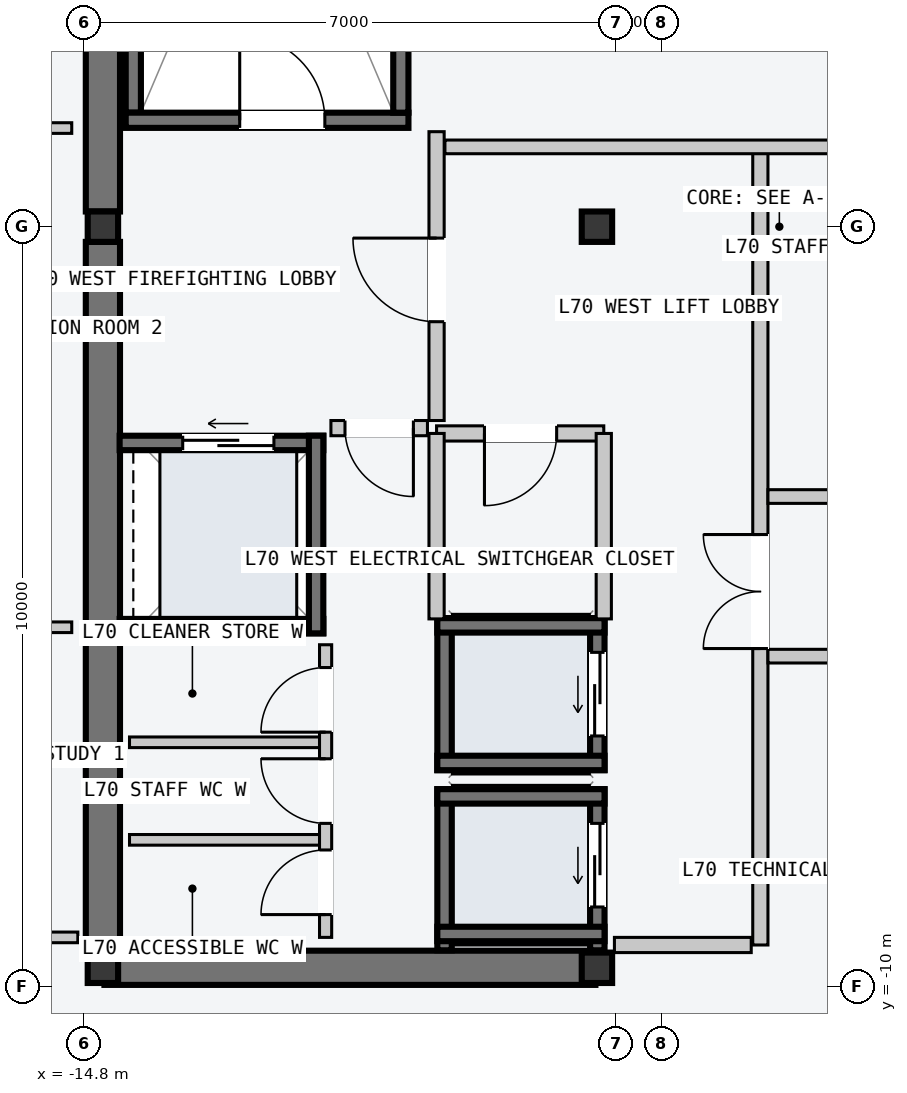
"""IFC4 building model, lengths in metres.
Left out: names, types, materials, properties, quantities, classifications, styles, units other than length and angle.
Written with IfcOpenShell. Run it as: python <this file> out.ifc"""

import sys

from ifc_helpers import new_model, si_unit, direction, frame, frame_2d, origin, origin_2d, place, context, subcontext, project, spatial, rectangle, i_section, extrude, element, fill, save


model = new_model("IFC4")
c1 = context("Model", 3, precision=1e-05, world=origin(), true_north=direction((0.0, 1.0)))
c2 = subcontext(c1, "Body", "Model", "MODEL_VIEW")
j1 = project(units=[si_unit("LENGTHUNIT", "METRE"), si_unit("PLANEANGLEUNIT", "RADIAN")], contexts=[c1])
p1 = place(None, origin())
s1 = spatial("IfcSite", under=j1, at=p1, CompositionType="ELEMENT")
p2 = place(p1, origin())
s2 = spatial("IfcBuilding", under=s1, at=p2, CompositionType="ELEMENT")
p3 = place(p2, frame((0.0, 0.0, 265.2)))
s3 = spatial("IfcBuildingStorey", under=s2, at=p3, CompositionType="ELEMENT", Elevation=265.2)
p4 = place(p3, frame((-14.53, -9.75, -0.2), z_axis=(0.0, 0.0, 1.0), x_axis=(1.0, 0.0, 0.0)))
e1 = element("IfcWall", 1, at=p4, inside=s3, PredefinedType="SHEAR", context=c2, shape_type="SweptSolid", body=[
    extrude(rectangle(XDim=6.46, YDim=0.45, at=frame_2d((3.23, 0.0))), origin(), (0.0, 0.0, 1.0), 3.6),
])
for number, where, z_axis, x_axis in (
    (2, (-14.55, -9.55, -0.2), (0.0, 0.0, 1.0), (0.0, 1.0, 0.0)),
    (3, (-14.55, 0.2, -0.2), (0.0, 0.0, 1.0), (0.0, 1.0, 0.0)),
):
    element("IfcWall", number, at=place(p3, frame(where, z_axis=z_axis, x_axis=x_axis)), inside=s3, PredefinedType="SHEAR", context=c2, shape_type="SweptSolid", body=[
        extrude(rectangle(XDim=9.35, YDim=0.45, at=frame_2d((4.675, 0.0))), origin(), (0.0, 0.0, 1.0), 3.6),
    ])
p5 = place(p3, frame((-14.15, 1.5, -0.2), z_axis=(0.0, 0.0, 1.0), x_axis=(0.0, 1.0, 0.0)))
e4 = element("IfcWall", 4, at=p5, inside=s3, PredefinedType="SOLIDWALL", context=c2, shape_type="SweptSolid", body=[
    extrude(rectangle(XDim=7.8, YDim=0.2, at=frame_2d((3.9, 0.0))), origin(), (0.0, 0.0, 1.0), 3.6),
])
p6 = place(p3, frame((-14.25, 1.4, -0.2), z_axis=(0.0, 0.0, 1.0), x_axis=(1.0, 0.0, 0.0)))
e5 = element("IfcWall", 5, at=p6, inside=s3, PredefinedType="SOLIDWALL", context=c2, shape_type="SweptSolid", body=[
    extrude(rectangle(XDim=3.72, YDim=0.2, at=frame_2d((1.86, 0.0))), origin(), (0.0, 0.0, 1.0), 3.6),
])
p7 = place(p6, frame((1.5, 0.0, 0.2)))
e6 = element("IfcOpeningElement", 6, at=p7, cuts=e5, PredefinedType="OPENING", context=c2, shape_type="SweptSolid", body=[
    extrude(rectangle(XDim=1.12, YDim=2.18, at=frame_2d((0.56, 1.09))), frame((0.0, 0.11, 0.0), z_axis=(0.0, -1.0, 0.0), x_axis=(1.0, 0.0, 0.0)), (0.0, 0.0, 1.0), 0.22),
])
p8 = place(p3, frame((-10.63, 1.5, -0.2), z_axis=(0.0, 0.0, 1.0), x_axis=(0.0, 1.0, 0.0)))
e7 = element("IfcWall", 7, at=p8, inside=s3, PredefinedType="SOLIDWALL", context=c2, shape_type="SweptSolid", body=[
    extrude(rectangle(XDim=7.8, YDim=0.2, at=frame_2d((3.9, 0.0))), origin(), (0.0, 0.0, 1.0), 3.6),
])
for number, where, z_axis, x_axis in (
    (8, (-14.55, -9.75, 0.0), (0.0, 0.0, 1.0), (1.0, 0.0, 0.0)),
    (9, (-14.55, 0.0, 0.0), (0.0, 0.0, 1.0), (1.0, 0.0, 0.0)),
    (10, (-8.05, -9.75, 0.0), (0.0, 0.0, 1.0), (1.0, 0.0, 0.0)),
    (11, (-8.05, 0.0, 0.0), (0.0, 0.0, 1.0), (1.0, 0.0, 0.0)),
):
    element("IfcColumn", number, at=place(p3, frame(where, z_axis=z_axis, x_axis=x_axis)), inside=s3, PredefinedType="COLUMN", context=c2, shape_type="SweptSolid", body=[
        extrude(i_section(OverallWidth=0.4, OverallDepth=0.4, WebThickness=0.013, FlangeThickness=0.021, at=origin_2d()), origin(), (0.0, 0.0, 1.0), 3.6),
    ])
p9 = place(p3, frame((-8.045, -9.52, -0.2), z_axis=(0.0, 0.0, 1.0), x_axis=(0.0, 1.0, 0.0)))
e12 = element("IfcWall", 12, at=p9, inside=s3, PredefinedType="SOLIDWALL", context=c2, shape_type="SweptSolid", body=[
    extrude(rectangle(XDim=2.12, YDim=0.19, at=frame_2d((1.06, 0.0))), origin(), (0.0, 0.0, 1.0), 3.6),
])
p10 = place(p9, frame((0.57, 0.0, 0.2)))
e13 = element("IfcOpeningElement", 13, at=p10, cuts=e12, PredefinedType="OPENING", context=c2, shape_type="SweptSolid", body=[
    extrude(rectangle(XDim=1.1, YDim=2.2, at=frame_2d((0.55, 1.1))), frame((0.0, 0.105, 0.0), z_axis=(0.0, -1.0, 0.0), x_axis=(1.0, 0.0, 0.0)), (0.0, 0.0, 1.0), 0.21),
])
p11 = place(p3, frame((-10.055, -9.52, -0.2), z_axis=(0.0, 0.0, 1.0), x_axis=(0.0, 1.0, 0.0)))
e14 = element("IfcWall", 14, at=p11, inside=s3, PredefinedType="SOLIDWALL", context=c2, shape_type="SweptSolid", body=[
    extrude(rectangle(XDim=2.12, YDim=0.19, at=frame_2d((1.06, 0.0))), origin(), (0.0, 0.0, 1.0), 3.6),
])
for number, where, z_axis, x_axis in (
    (15, (-10.15, -7.495, -0.2), (0.0, 0.0, 1.0), (1.0, 0.0, 0.0)),
    (16, (-10.15, -9.305, -0.2), (0.0, 0.0, 1.0), (1.0, 0.0, 0.0)),
):
    element("IfcWall", number, at=place(p3, frame(where, z_axis=z_axis, x_axis=x_axis)), inside=s3, PredefinedType="SOLIDWALL", context=c2, shape_type="SweptSolid", body=[
        extrude(rectangle(XDim=2.2, YDim=0.19, at=frame_2d((1.1, 0.0))), origin(), (0.0, 0.0, 1.0), 3.6),
    ])
p12 = place(p3, frame((-8.045, -7.15, -0.2), z_axis=(0.0, 0.0, 1.0), x_axis=(0.0, 1.0, 0.0)))
e17 = element("IfcWall", 17, at=p12, inside=s3, PredefinedType="SOLIDWALL", context=c2, shape_type="SweptSolid", body=[
    extrude(rectangle(XDim=2.0, YDim=0.19, at=frame_2d((1.0, 0.0))), origin(), (0.0, 0.0, 1.0), 3.6),
])
p13 = place(p12, frame((0.45, 0.0, 0.2)))
e18 = element("IfcOpeningElement", 18, at=p13, cuts=e17, PredefinedType="OPENING", context=c2, shape_type="SweptSolid", body=[
    extrude(rectangle(XDim=1.1, YDim=2.2, at=frame_2d((0.55, 1.1))), frame((0.0, 0.105, 0.0), z_axis=(0.0, -1.0, 0.0), x_axis=(1.0, 0.0, 0.0)), (0.0, 0.0, 1.0), 0.21),
])
p14 = place(p3, frame((-10.055, -7.15, -0.2), z_axis=(0.0, 0.0, 1.0), x_axis=(0.0, 1.0, 0.0)))
e19 = element("IfcWall", 19, at=p14, inside=s3, PredefinedType="SOLIDWALL", context=c2, shape_type="SweptSolid", body=[
    extrude(rectangle(XDim=2.0, YDim=0.19, at=frame_2d((1.0, 0.0))), origin(), (0.0, 0.0, 1.0), 3.6),
])
for number, where, z_axis, x_axis in (
    (20, (-10.15, -5.245, -0.2), (0.0, 0.0, 1.0), (1.0, 0.0, 0.0)),
    (21, (-10.15, -7.055, -0.2), (0.0, 0.0, 1.0), (1.0, 0.0, 0.0)),
):
    element("IfcWall", number, at=place(p3, frame(where, z_axis=z_axis, x_axis=x_axis)), inside=s3, PredefinedType="SOLIDWALL", context=c2, shape_type="SweptSolid", body=[
        extrude(rectangle(XDim=2.2, YDim=0.19, at=frame_2d((1.1, 0.0))), origin(), (0.0, 0.0, 1.0), 3.6),
    ])
p15 = place(p3, frame((-14.33, -2.845, -0.2), z_axis=(0.0, 0.0, 1.0), x_axis=(1.0, 0.0, 0.0)))
e22 = element("IfcWall", 22, at=p15, inside=s3, PredefinedType="SOLIDWALL", context=c2, shape_type="SweptSolid", body=[
    extrude(rectangle(XDim=2.68, YDim=0.19, at=frame_2d((1.34, 0.0))), origin(), (0.0, 0.0, 1.0), 3.6),
])
p16 = place(p15, frame((0.83, 0.0, 0.2)))
e23 = element("IfcOpeningElement", 23, at=p16, cuts=e22, PredefinedType="OPENING", context=c2, shape_type="SweptSolid", body=[
    extrude(rectangle(XDim=1.2, YDim=2.2, at=frame_2d((0.6, 1.1))), frame((0.0, 0.105, 0.0), z_axis=(0.0, -1.0, 0.0), x_axis=(1.0, 0.0, 0.0)), (0.0, 0.0, 1.0), 0.21),
])
p17 = place(p3, frame((-14.33, -5.255, -0.2), z_axis=(0.0, 0.0, 1.0), x_axis=(1.0, 0.0, 0.0)))
e24 = element("IfcWall", 24, at=p17, inside=s3, PredefinedType="SOLIDWALL", context=c2, shape_type="SweptSolid", body=[
    extrude(rectangle(XDim=2.68, YDim=0.19, at=frame_2d((1.34, 0.0))), origin(), (0.0, 0.0, 1.0), 3.6),
])
p18 = place(p3, frame((-11.745, -5.35, -0.2), z_axis=(0.0, 0.0, 1.0), x_axis=(0.0, 1.0, 0.0)))
e25 = element("IfcWall", 25, at=p18, inside=s3, PredefinedType="SOLIDWALL", context=c2, shape_type="SweptSolid", body=[
    extrude(rectangle(XDim=2.6, YDim=0.19, at=frame_2d((1.3, 0.0))), origin(), (0.0, 0.0, 1.0), 3.6),
])
p19 = place(p3, frame((-5.9, -9.45, 0.0), z_axis=(0.0, 0.0, 1.0), x_axis=(0.0, 1.0, 0.0)))
e26 = element("IfcWall", 26, at=p19, inside=s3, PredefinedType="PARTITIONING", context=c2, shape_type="SweptSolid", body=[
    extrude(rectangle(XDim=10.5, YDim=0.2, at=frame_2d((5.25, 0.0))), origin(), (0.0, 0.0, 1.0), 3.4),
])
p20 = place(p19, frame((3.9, 0.0, 0.0)))
e27 = element("IfcOpeningElement", 27, at=p20, cuts=e26, PredefinedType="OPENING", context=c2, shape_type="SweptSolid", body=[
    extrude(rectangle(XDim=1.5, YDim=2.2, at=frame_2d((0.75, 1.1))), frame((0.0, 0.11, 0.0), z_axis=(0.0, -1.0, 0.0), x_axis=(1.0, 0.0, 0.0)), (0.0, 0.0, 1.0), 0.22),
])
p21 = place(p3, frame((-6.02, -9.45, 0.0), z_axis=(0.0, 0.0, 1.0), x_axis=(-1.0, 0.0, 0.0)))
e28 = element("IfcWall", 28, at=p21, inside=s3, PredefinedType="PARTITIONING", context=c2, shape_type="SweptSolid", body=[
    extrude(rectangle(XDim=1.8, YDim=0.2, at=frame_2d((0.9, 0.0))), origin(), (0.0, 0.0, 1.0), 3.4),
])
p22 = place(p3, frame((-10.16, -2.55, 0.0), z_axis=(0.0, 0.0, 1.0), x_axis=(0.0, 1.0, 0.0)))
e29 = element("IfcWall", 29, at=p22, inside=s3, PredefinedType="PARTITIONING", context=c2, shape_type="SweptSolid", body=[
    extrude(rectangle(XDim=3.8, YDim=0.2, at=frame_2d((1.9, 0.0))), origin(), (0.0, 0.0, 1.0), 3.4),
])
p23 = place(p22, frame((1.3, 0.0, 0.0)))
e30 = element("IfcOpeningElement", 30, at=p23, cuts=e29, PredefinedType="OPENING", context=c2, shape_type="SweptSolid", body=[
    extrude(rectangle(XDim=1.1, YDim=2.15, at=frame_2d((0.55, 1.075))), frame((0.0, 0.11, 0.0), z_axis=(0.0, -1.0, 0.0), x_axis=(1.0, 0.0, 0.0)), (0.0, 0.0, 1.0), 0.22),
])
p24 = place(p3, frame((-10.28, -2.65, 0.0), z_axis=(0.0, 0.0, 1.0), x_axis=(-1.0, 0.0, 0.0)))
e31 = element("IfcWall", 31, at=p24, inside=s3, PredefinedType="PARTITIONING", context=c2, shape_type="SweptSolid", body=[
    extrude(rectangle(XDim=1.27, YDim=0.2, at=frame_2d((0.635, 0.0))), origin(), (0.0, 0.0, 1.0), 3.4),
])
p25 = place(p24, frame((0.185, 0.0, 0.0)))
e32 = element("IfcOpeningElement", 32, at=p25, cuts=e31, PredefinedType="OPENING", context=c2, shape_type="SweptSolid", body=[
    extrude(rectangle(XDim=0.9, YDim=2.15, at=frame_2d((0.45, 1.075))), frame((0.0, 0.11, 0.0), z_axis=(0.0, -1.0, 0.0), x_axis=(1.0, 0.0, 0.0)), (0.0, 0.0, 1.0), 0.22),
])
p26 = place(p3, frame((-7.96, -2.72, 0.0), z_axis=(0.0, 0.0, 1.0), x_axis=(-1.0, 0.0, 0.0)))
e33 = element("IfcWall", 33, at=p26, inside=s3, PredefinedType="PARTITIONING", context=c2, shape_type="SweptSolid", body=[
    extrude(rectangle(XDim=2.2, YDim=0.2, at=frame_2d((1.1, 0.0))), origin(), (0.0, 0.0, 1.0), 3.4),
])
p27 = place(p26, frame((0.62, 0.0, 0.0)))
e34 = element("IfcOpeningElement", 34, at=p27, cuts=e33, PredefinedType="OPENING", context=c2, shape_type="SweptSolid", body=[
    extrude(rectangle(XDim=0.95, YDim=2.1, at=frame_2d((0.475, 1.05))), frame((0.0, 0.11, 0.0), z_axis=(0.0, -1.0, 0.0), x_axis=(1.0, 0.0, 0.0)), (0.0, 0.0, 1.0), 0.22),
])
for number, where, z_axis, x_axis in (
    (35, (-7.96, -5.16, 0.0), (0.0, 0.0, 1.0), (0.0, 1.0, 0.0)),
    (36, (-10.16, -5.16, 0.0), (0.0, 0.0, 1.0), (0.0, 1.0, 0.0)),
):
    element("IfcWall", number, at=place(p3, frame(where, z_axis=z_axis, x_axis=x_axis)), inside=s3, PredefinedType="PARTITIONING", context=c2, shape_type="SweptSolid", body=[
        extrude(rectangle(XDim=2.44, YDim=0.2, at=frame_2d((1.22, 0.0))), origin(), (0.0, 0.0, 1.0), 3.4),
    ])
for number, where, z_axis, x_axis in (
    (37, (-11.7, -8.067, 0.0), (0.0, 0.0, 1.0), (-1.0, 0.0, 0.0)),
    (38, (-11.7, -6.783, 0.0), (0.0, 0.0, 1.0), (-1.0, 0.0, 0.0)),
):
    element("IfcWall", number, at=place(p3, frame(where, z_axis=z_axis, x_axis=x_axis)), inside=s3, PredefinedType="PARTITIONING", context=c2, shape_type="SweptSolid", body=[
        extrude(rectangle(XDim=2.5, YDim=0.14, at=frame_2d((1.25, 0.0))), origin(), (0.0, 0.0, 1.0), 3.4),
    ])
p28 = place(p3, frame((-11.62, -9.35, 0.0), z_axis=(0.0, 0.0, 1.0), x_axis=(0.0, 1.0, 0.0)))
e39 = element("IfcWall", 39, at=p28, inside=s3, PredefinedType="PARTITIONING", context=c2, shape_type="SweptSolid", body=[
    extrude(rectangle(XDim=3.85, YDim=0.16, at=frame_2d((1.925, 0.0))), origin(), (0.0, 0.0, 1.0), 3.4),
])
p29 = place(p28, frame((0.3, 0.0, 0.0)))
e40 = element("IfcOpeningElement", 40, at=p29, cuts=e39, PredefinedType="OPENING", context=c2, shape_type="SweptSolid", body=[
    extrude(rectangle(XDim=0.85, YDim=2.12, at=frame_2d((0.425, 1.06))), frame((0.0, 0.09, 0.0), z_axis=(0.0, -1.0, 0.0), x_axis=(1.0, 0.0, 0.0)), (0.0, 0.0, 1.0), 0.18),
])
p30 = place(p28, frame((1.5, 0.0, 0.0)))
e41 = element("IfcOpeningElement", 41, at=p30, cuts=e39, PredefinedType="OPENING", context=c2, shape_type="SweptSolid", body=[
    extrude(rectangle(XDim=0.85, YDim=2.12, at=frame_2d((0.425, 1.06))), frame((0.0, 0.09, 0.0), z_axis=(0.0, -1.0, 0.0), x_axis=(1.0, 0.0, 0.0)), (0.0, 0.0, 1.0), 0.18),
])
p31 = place(p28, frame((2.7, 0.0, 0.0)))
e42 = element("IfcOpeningElement", 42, at=p31, cuts=e39, PredefinedType="OPENING", context=c2, shape_type="SweptSolid", body=[
    extrude(rectangle(XDim=0.85, YDim=2.12, at=frame_2d((0.425, 1.06))), frame((0.0, 0.09, 0.0), z_axis=(0.0, -1.0, 0.0), x_axis=(1.0, 0.0, 0.0)), (0.0, 0.0, 1.0), 0.18),
])
p32 = place(p3, frame((-10.05, 1.05, 0.0), z_axis=(0.0, 0.0, 1.0), x_axis=(1.0, 0.0, 0.0)))
e43 = element("IfcWall", 43, at=p32, inside=s3, PredefinedType="PARTITIONING", context=c2, shape_type="SweptSolid", body=[
    extrude(rectangle(XDim=7.04, YDim=0.18, at=frame_2d((3.52, 0.0))), origin(), (0.0, 0.0, 1.0), 3.4),
])
for number, where, z_axis, x_axis in (
    (44, (-5.8, -3.55, 0.0), (0.0, 0.0, 1.0), (1.0, 0.0, 0.0)),
    (45, (-5.8, -5.65, 0.0), (0.0, 0.0, 1.0), (1.0, 0.0, 0.0)),
):
    element("IfcWall", number, at=place(p3, frame(where, z_axis=z_axis, x_axis=x_axis)), inside=s3, PredefinedType="PARTITIONING", context=c2, shape_type="SweptSolid", body=[
        extrude(rectangle(XDim=2.79, YDim=0.18, at=frame_2d((1.395, 0.0))), origin(), (0.0, 0.0, 1.0), 3.4),
    ])
p33 = place(p3, frame((-17.55, -9.35, 0.0), z_axis=(0.0, 0.0, 1.0), x_axis=(1.0, 0.0, 0.0)))
e46 = element("IfcWall", 46, at=p33, inside=s3, PredefinedType="PARTITIONING", context=c2, shape_type="SweptSolid", body=[
    extrude(rectangle(XDim=2.67, YDim=0.14, at=frame_2d((1.335, 0.0))), origin(), (0.0, 0.0, 1.0), 3.4),
])
p34 = place(p33, frame((0.855, 0.0, 0.0)))
e47 = element("IfcOpeningElement", 47, at=p34, cuts=e46, PredefinedType="OPENING", context=c2, shape_type="SweptSolid", body=[
    extrude(rectangle(XDim=0.96, YDim=2.18, at=frame_2d((0.48, 1.09))), frame((0.0, 0.08, 0.0), z_axis=(0.0, -1.0, 0.0), x_axis=(1.0, 0.0, 0.0)), (0.0, 0.0, 1.0), 0.16),
])
p35 = place(p3, frame((-17.55, -5.27, 0.0), z_axis=(0.0, 0.0, 1.0), x_axis=(1.0, 0.0, 0.0)))
e48 = element("IfcWall", 48, at=p35, inside=s3, PredefinedType="PARTITIONING", context=c2, shape_type="SweptSolid", body=[
    extrude(rectangle(XDim=2.59, YDim=0.14, at=frame_2d((1.295, 0.0))), origin(), (0.0, 0.0, 1.0), 3.4),
])
p36 = place(p35, frame((0.9, 0.0, 0.0)))
e49 = element("IfcOpeningElement", 49, at=p36, cuts=e48, PredefinedType="OPENING", context=c2, shape_type="SweptSolid", body=[
    extrude(rectangle(XDim=0.96, YDim=2.18, at=frame_2d((0.48, 1.09))), frame((0.0, 0.08, 0.0), z_axis=(0.0, -1.0, 0.0), x_axis=(1.0, 0.0, 0.0)), (0.0, 0.0, 1.0), 0.16),
])
p37 = place(p3, frame((-18.56, 1.298, 0.0), z_axis=(0.0, 0.0, 1.0), x_axis=(1.0, 0.0, 0.0)))
e50 = element("IfcWall", 50, at=p37, inside=s3, PredefinedType="PARTITIONING", context=c2, shape_type="SweptSolid", body=[
    extrude(rectangle(XDim=3.6, YDim=0.14, at=frame_2d((1.8, 0.0))), origin(), (0.0, 0.0, 1.0), 3.4),
])
p38 = place(p37, frame((0.9, 0.0, 0.0)))
e51 = element("IfcOpeningElement", 51, at=p38, cuts=e50, PredefinedType="OPENING", context=c2, shape_type="SweptSolid", body=[
    extrude(rectangle(XDim=0.96, YDim=2.18, at=frame_2d((0.48, 1.09))), frame((0.0, 0.08, 0.0), z_axis=(0.0, -1.0, 0.0), x_axis=(1.0, 0.0, 0.0)), (0.0, 0.0, 1.0), 0.16),
])
p39 = place(p7, origin())
e52 = element("IfcDoor", 52, at=p39, inside=s3, OperationType="SINGLE_SWING_LEFT", PredefinedType="DOOR", context=c2, shape_type="SweptSolid", body=[
    extrude(rectangle(XDim=1.12, YDim=2.18, at=frame_2d((0.56, 1.09))), frame((0.0, 0.025, 0.0), z_axis=(0.0, -1.0, 0.0), x_axis=(1.0, 0.0, 0.0)), (0.0, 0.0, 1.0), 0.05),
])
fill(e6, e52)
p40 = place(p10, origin())
e53 = element("IfcDoor", 53, at=p40, inside=s3, OperationType="SLIDING_TO_LEFT", PredefinedType="DOOR", context=c2, shape_type="SweptSolid", body=[
    extrude(rectangle(XDim=1.1, YDim=2.2, at=frame_2d((0.55, 1.1))), frame((0.0, 0.025, 0.0), z_axis=(0.0, -1.0, 0.0), x_axis=(1.0, 0.0, 0.0)), (0.0, 0.0, 1.0), 0.05),
])
fill(e13, e53)
p41 = place(p13, origin())
e54 = element("IfcDoor", 54, at=p41, inside=s3, OperationType="SLIDING_TO_LEFT", PredefinedType="DOOR", context=c2, shape_type="SweptSolid", body=[
    extrude(rectangle(XDim=1.1, YDim=2.2, at=frame_2d((0.55, 1.1))), frame((0.0, 0.025, 0.0), z_axis=(0.0, -1.0, 0.0), x_axis=(1.0, 0.0, 0.0)), (0.0, 0.0, 1.0), 0.05),
])
fill(e18, e54)
p42 = place(p16, origin())
e55 = element("IfcDoor", 55, at=p42, inside=s3, OperationType="SLIDING_TO_LEFT", PredefinedType="DOOR", context=c2, shape_type="SweptSolid", body=[
    extrude(rectangle(XDim=1.2, YDim=2.2, at=frame_2d((0.6, 1.1))), frame((0.0, 0.025, 0.0), z_axis=(0.0, -1.0, 0.0), x_axis=(1.0, 0.0, 0.0)), (0.0, 0.0, 1.0), 0.05),
])
fill(e23, e55)
p43 = place(p20, origin())
e56 = element("IfcDoor", 56, at=p43, inside=s3, OperationType="DOUBLE_DOOR_SINGLE_SWING", PredefinedType="DOOR", context=c2, shape_type="SweptSolid", body=[
    extrude(rectangle(XDim=1.5, YDim=2.2, at=frame_2d((0.75, 1.1))), frame((0.0, 0.025, 0.0), z_axis=(0.0, -1.0, 0.0), x_axis=(1.0, 0.0, 0.0)), (0.0, 0.0, 1.0), 0.05),
])
fill(e27, e56)
p44 = place(p23, origin())
e57 = element("IfcDoor", 57, at=p44, inside=s3, OperationType="SINGLE_SWING_RIGHT", PredefinedType="DOOR", context=c2, shape_type="SweptSolid", body=[
    extrude(rectangle(XDim=1.1, YDim=2.15, at=frame_2d((0.55, 1.075))), frame((0.0, 0.025, 0.0), z_axis=(0.0, -1.0, 0.0), x_axis=(1.0, 0.0, 0.0)), (0.0, 0.0, 1.0), 0.05),
])
fill(e30, e57)
p45 = place(p25, origin())
e58 = element("IfcDoor", 58, at=p45, inside=s3, OperationType="SINGLE_SWING_LEFT", PredefinedType="DOOR", context=c2, shape_type="SweptSolid", body=[
    extrude(rectangle(XDim=0.9, YDim=2.15, at=frame_2d((0.45, 1.075))), frame((0.0, 0.025, 0.0), z_axis=(0.0, -1.0, 0.0), x_axis=(1.0, 0.0, 0.0)), (0.0, 0.0, 1.0), 0.05),
])
fill(e32, e58)
p46 = place(p27, origin())
e59 = element("IfcDoor", 59, at=p46, inside=s3, OperationType="SINGLE_SWING_RIGHT", PredefinedType="DOOR", context=c2, shape_type="SweptSolid", body=[
    extrude(rectangle(XDim=0.95, YDim=2.1, at=frame_2d((0.475, 1.05))), frame((0.0, 0.025, 0.0), z_axis=(0.0, -1.0, 0.0), x_axis=(1.0, 0.0, 0.0)), (0.0, 0.0, 1.0), 0.05),
])
fill(e34, e59)
p47 = place(p29, origin())
e60 = element("IfcDoor", 60, at=p47, inside=s3, OperationType="SINGLE_SWING_LEFT", PredefinedType="DOOR", context=c2, shape_type="SweptSolid", body=[
    extrude(rectangle(XDim=0.85, YDim=2.12, at=frame_2d((0.425, 1.06))), frame((0.0, 0.025, 0.0), z_axis=(0.0, -1.0, 0.0), x_axis=(1.0, 0.0, 0.0)), (0.0, 0.0, 1.0), 0.05),
])
fill(e40, e60)
p48 = place(p30, origin())
e61 = element("IfcDoor", 61, at=p48, inside=s3, OperationType="SINGLE_SWING_RIGHT", PredefinedType="DOOR", context=c2, shape_type="SweptSolid", body=[
    extrude(rectangle(XDim=0.85, YDim=2.12, at=frame_2d((0.425, 1.06))), frame((0.0, 0.025, 0.0), z_axis=(0.0, -1.0, 0.0), x_axis=(1.0, 0.0, 0.0)), (0.0, 0.0, 1.0), 0.05),
])
fill(e41, e61)
p49 = place(p31, origin())
e62 = element("IfcDoor", 62, at=p49, inside=s3, OperationType="SINGLE_SWING_LEFT", PredefinedType="DOOR", context=c2, shape_type="SweptSolid", body=[
    extrude(rectangle(XDim=0.85, YDim=2.12, at=frame_2d((0.425, 1.06))), frame((0.0, 0.025, 0.0), z_axis=(0.0, -1.0, 0.0), x_axis=(1.0, 0.0, 0.0)), (0.0, 0.0, 1.0), 0.05),
])
fill(e42, e62)
save(model, sys.argv[1])
